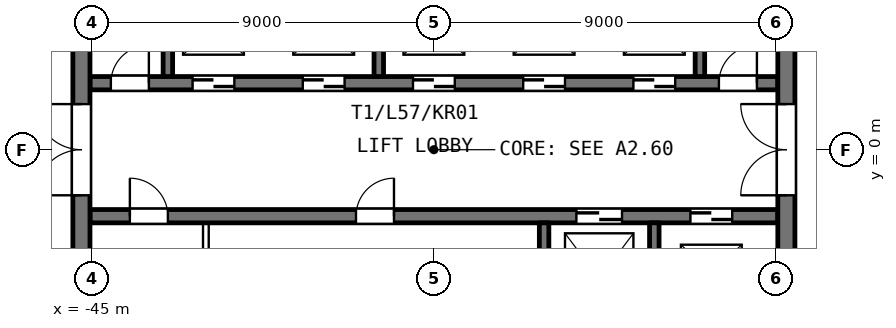
"""IFC4 building model, lengths in metres.
Left out: names, types, materials, properties, quantities, classifications, styles, units other than length and angle.
Written with IfcOpenShell. Run it as: python <this file> out.ifc"""

import sys

from ifc_helpers import new_model, si_unit, direction, frame, frame_2d, origin, place, context, subcontext, project, spatial, rectangle, extrude, element, fill, save


model = new_model("IFC4")
c1 = context("Model", 3, precision=1e-05, world=origin(), true_north=direction((0.0, 1.0)))
c2 = subcontext(c1, "Body", "Model", "MODEL_VIEW")
j1 = project(units=[si_unit("LENGTHUNIT", "METRE"), si_unit("PLANEANGLEUNIT", "RADIAN")], contexts=[c1])
p1 = place(None, origin())
s1 = spatial("IfcSite", under=j1, at=p1, CompositionType="ELEMENT")
p2 = place(p1, origin())
s2 = spatial("IfcBuilding", under=s1, at=p2, CompositionType="ELEMENT")
p3 = place(p2, frame((0.0, 0.0, 240.6)))
s3 = spatial("IfcBuildingStorey", under=s2, at=p3, CompositionType="ELEMENT", Elevation=240.6)
p4 = place(p3, frame((-45.05, -1.75, 0.0), z_axis=(0.0, 0.0, 1.0), x_axis=(1.0, 0.0, 0.0)))
e1 = element("IfcWall", 1, at=p4, inside=s3, PredefinedType="SHEAR", context=c2, shape_type="SweptSolid", body=[
    extrude(rectangle(XDim=18.1, YDim=0.35, at=frame_2d((9.05, 0.0))), origin(), (0.0, 0.0, 1.0), 3.6),
])
p5 = place(p4, frame((12.8, 0.0, 0.0)))
e2 = element("IfcOpeningElement", 2, at=p5, cuts=e1, PredefinedType="OPENING", context=c2, shape_type="SweptSolid", body=[
    extrude(rectangle(XDim=1.2, YDim=2.1, at=frame_2d((0.6, 1.05))), frame((0.0, 0.185, 0.0), z_axis=(0.0, -1.0, 0.0), x_axis=(1.0, 0.0, 0.0)), (0.0, 0.0, 1.0), 0.37),
])
p6 = place(p4, frame((15.8, 0.0, 0.0)))
e3 = element("IfcOpeningElement", 3, at=p6, cuts=e1, PredefinedType="OPENING", context=c2, shape_type="SweptSolid", body=[
    extrude(rectangle(XDim=1.1, YDim=2.1, at=frame_2d((0.55, 1.05))), frame((0.0, 0.185, 0.0), z_axis=(0.0, -1.0, 0.0), x_axis=(1.0, 0.0, 0.0)), (0.0, 0.0, 1.0), 0.37),
])
p7 = place(p4, frame((1.05, 0.0, 0.0)))
e4 = element("IfcOpeningElement", 4, at=p7, cuts=e1, PredefinedType="OPENING", context=c2, shape_type="SweptSolid", body=[
    extrude(rectangle(XDim=1.0, YDim=2.1, at=frame_2d((0.5, 1.05))), frame((0.0, 0.185, 0.0), z_axis=(0.0, -1.0, 0.0), x_axis=(1.0, 0.0, 0.0)), (0.0, 0.0, 1.0), 0.37),
])
p8 = place(p4, frame((7.0, 0.0, 0.0)))
e5 = element("IfcOpeningElement", 5, at=p8, cuts=e1, PredefinedType="OPENING", context=c2, shape_type="SweptSolid", body=[
    extrude(rectangle(XDim=1.0, YDim=2.1, at=frame_2d((0.5, 1.05))), frame((0.0, 0.185, 0.0), z_axis=(0.0, -1.0, 0.0), x_axis=(1.0, 0.0, 0.0)), (0.0, 0.0, 1.0), 0.37),
])
p9 = place(p3, frame((-45.05, 1.75, 0.0), z_axis=(0.0, 0.0, 1.0), x_axis=(1.0, 0.0, 0.0)))
e6 = element("IfcWall", 6, at=p9, inside=s3, PredefinedType="SHEAR", context=c2, shape_type="SweptSolid", body=[
    extrude(rectangle(XDim=18.1, YDim=0.35, at=frame_2d((9.05, 0.0))), origin(), (0.0, 0.0, 1.0), 3.6),
])
p10 = place(p9, frame((0.55, 0.0, 0.0)))
e7 = element("IfcOpeningElement", 7, at=p10, cuts=e6, PredefinedType="OPENING", context=c2, shape_type="SweptSolid", body=[
    extrude(rectangle(XDim=1.0, YDim=2.1, at=frame_2d((0.5, 1.05))), frame((0.0, 0.185, 0.0), z_axis=(0.0, -1.0, 0.0), x_axis=(1.0, 0.0, 0.0)), (0.0, 0.0, 1.0), 0.37),
])
p11 = place(p9, frame((2.7, 0.0, 0.0)))
e8 = element("IfcOpeningElement", 8, at=p11, cuts=e6, PredefinedType="OPENING", context=c2, shape_type="SweptSolid", body=[
    extrude(rectangle(XDim=1.1, YDim=2.1, at=frame_2d((0.55, 1.05))), frame((0.0, 0.185, 0.0), z_axis=(0.0, -1.0, 0.0), x_axis=(1.0, 0.0, 0.0)), (0.0, 0.0, 1.0), 0.37),
])
p12 = place(p9, frame((5.6, 0.0, 0.0)))
e9 = element("IfcOpeningElement", 9, at=p12, cuts=e6, PredefinedType="OPENING", context=c2, shape_type="SweptSolid", body=[
    extrude(rectangle(XDim=1.1, YDim=2.1, at=frame_2d((0.55, 1.05))), frame((0.0, 0.185, 0.0), z_axis=(0.0, -1.0, 0.0), x_axis=(1.0, 0.0, 0.0)), (0.0, 0.0, 1.0), 0.37),
])
p13 = place(p9, frame((8.5, 0.0, 0.0)))
e10 = element("IfcOpeningElement", 10, at=p13, cuts=e6, PredefinedType="OPENING", context=c2, shape_type="SweptSolid", body=[
    extrude(rectangle(XDim=1.1, YDim=2.1, at=frame_2d((0.55, 1.05))), frame((0.0, 0.185, 0.0), z_axis=(0.0, -1.0, 0.0), x_axis=(1.0, 0.0, 0.0)), (0.0, 0.0, 1.0), 0.37),
])
p14 = place(p9, frame((11.4, 0.0, 0.0)))
e11 = element("IfcOpeningElement", 11, at=p14, cuts=e6, PredefinedType="OPENING", context=c2, shape_type="SweptSolid", body=[
    extrude(rectangle(XDim=1.1, YDim=2.1, at=frame_2d((0.55, 1.05))), frame((0.0, 0.185, 0.0), z_axis=(0.0, -1.0, 0.0), x_axis=(1.0, 0.0, 0.0)), (0.0, 0.0, 1.0), 0.37),
])
p15 = place(p9, frame((14.3, 0.0, 0.0)))
e12 = element("IfcOpeningElement", 12, at=p15, cuts=e6, PredefinedType="OPENING", context=c2, shape_type="SweptSolid", body=[
    extrude(rectangle(XDim=1.1, YDim=2.1, at=frame_2d((0.55, 1.05))), frame((0.0, 0.185, 0.0), z_axis=(0.0, -1.0, 0.0), x_axis=(1.0, 0.0, 0.0)), (0.0, 0.0, 1.0), 0.37),
])
p16 = place(p9, frame((16.55, 0.0, 0.0)))
e13 = element("IfcOpeningElement", 13, at=p16, cuts=e6, PredefinedType="OPENING", context=c2, shape_type="SweptSolid", body=[
    extrude(rectangle(XDim=1.0, YDim=2.1, at=frame_2d((0.5, 1.05))), frame((0.0, 0.185, 0.0), z_axis=(0.0, -1.0, 0.0), x_axis=(1.0, 0.0, 0.0)), (0.0, 0.0, 1.0), 0.37),
])
p17 = place(p3, frame((-45.275, -9.5, 0.0), z_axis=(0.0, 0.0, 1.0), x_axis=(0.0, 1.0, 0.0)))
e14 = element("IfcWall", 14, at=p17, inside=s3, PredefinedType="SHEAR", context=c2, shape_type="SweptSolid", body=[
    extrude(rectangle(XDim=19.0, YDim=0.45, at=frame_2d((9.5, 0.0))), origin(), (0.0, 0.0, 1.0), 3.6),
])
p18 = place(p17, frame((8.3, 0.0, 0.0)))
e15 = element("IfcOpeningElement", 15, at=p18, cuts=e14, PredefinedType="OPENING", context=c2, shape_type="SweptSolid", body=[
    extrude(rectangle(XDim=2.4, YDim=2.1, at=frame_2d((1.2, 1.05))), frame((0.0, 0.235, 0.0), z_axis=(0.0, -1.0, 0.0), x_axis=(1.0, 0.0, 0.0)), (0.0, 0.0, 1.0), 0.47),
])
p19 = place(p3, frame((-43.0, 1.925, 0.0), z_axis=(0.0, 0.0, 1.0), x_axis=(0.0, 1.0, 0.0)))
e16 = element("IfcWall", 16, at=p19, inside=s3, PredefinedType="SHEAR", context=c2, shape_type="SweptSolid", body=[
    extrude(rectangle(XDim=2.7, YDim=0.25, at=frame_2d((1.35, 0.0))), origin(), (0.0, 0.0, 1.0), 3.6),
])
p20 = place(p3, frame((-42.0, -4.675, 0.0), z_axis=(0.0, 0.0, 1.0), x_axis=(0.0, 1.0, 0.0)))
e17 = element("IfcWall", 17, at=p20, inside=s3, PredefinedType="PARTITIONING", context=c2, shape_type="SweptSolid", body=[
    extrude(rectangle(XDim=2.75, YDim=0.15, at=frame_2d((1.375, 0.0))), origin(), (0.0, 0.0, 1.0), 3.6),
])
for number, where, z_axis, x_axis in (
    (18, (-37.45, 1.925, 0.0), (0.0, 0.0, 1.0), (0.0, 1.0, 0.0)),
    (19, (-33.1, -4.625, 0.0), (0.0, 0.0, 1.0), (0.0, 1.0, 0.0)),
    (20, (-30.2, -4.625, 0.0), (0.0, 0.0, 1.0), (0.0, 1.0, 0.0)),
):
    element("IfcWall", number, at=place(p3, frame(where, z_axis=z_axis, x_axis=x_axis)), inside=s3, PredefinedType="SHEAR", context=c2, shape_type="SweptSolid", body=[
        extrude(rectangle(XDim=2.7, YDim=0.25, at=frame_2d((1.35, 0.0))), origin(), (0.0, 0.0, 1.0), 3.6),
    ])
p21 = place(p3, frame((-29.0, 1.925, 0.0), z_axis=(0.0, 0.0, 1.0), x_axis=(0.0, 1.0, 0.0)))
e21 = element("IfcWall", 21, at=p21, inside=s3, PredefinedType="SHEAR", context=c2, shape_type="SweptSolid", body=[
    extrude(rectangle(XDim=2.95, YDim=0.25, at=frame_2d((1.475, 0.0))), origin(), (0.0, 0.0, 1.0), 3.6),
])
p22 = place(p3, frame((-26.725, -9.5, 0.0), z_axis=(0.0, 0.0, 1.0), x_axis=(0.0, 1.0, 0.0)))
e22 = element("IfcWall", 22, at=p22, inside=s3, PredefinedType="SHEAR", context=c2, shape_type="SweptSolid", body=[
    extrude(rectangle(XDim=19.0, YDim=0.45, at=frame_2d((9.5, 0.0))), origin(), (0.0, 0.0, 1.0), 3.6),
])
p23 = place(p22, frame((8.3, 0.0, 0.0)))
e23 = element("IfcOpeningElement", 23, at=p23, cuts=e22, PredefinedType="OPENING", context=c2, shape_type="SweptSolid", body=[
    extrude(rectangle(XDim=2.4, YDim=2.1, at=frame_2d((1.2, 1.05))), frame((0.0, 0.235, 0.0), z_axis=(0.0, -1.0, 0.0), x_axis=(1.0, 0.0, 0.0)), (0.0, 0.0, 1.0), 0.47),
])
p24 = place(p18, origin())
e24 = element("IfcDoor", 24, at=p24, inside=s3, OperationType="DOUBLE_DOOR_SINGLE_SWING", PredefinedType="DOOR", context=c2, shape_type="SweptSolid", body=[
    extrude(rectangle(XDim=2.4, YDim=2.1, at=frame_2d((1.2, 1.05))), frame((0.0, 0.025, 0.0), z_axis=(0.0, -1.0, 0.0), x_axis=(1.0, 0.0, 0.0)), (0.0, 0.0, 1.0), 0.05),
])
fill(e15, e24)
p25 = place(p23, origin())
e25 = element("IfcDoor", 25, at=p25, inside=s3, OperationType="DOUBLE_DOOR_SINGLE_SWING", PredefinedType="DOOR", context=c2, shape_type="SweptSolid", body=[
    extrude(rectangle(XDim=2.4, YDim=2.1, at=frame_2d((1.2, 1.05))), frame((0.0, 0.025, 0.0), z_axis=(0.0, -1.0, 0.0), x_axis=(1.0, 0.0, 0.0)), (0.0, 0.0, 1.0), 0.05),
])
fill(e23, e25)
p26 = place(p10, origin())
e26 = element("IfcDoor", 26, at=p26, inside=s3, OperationType="SINGLE_SWING_RIGHT", PredefinedType="DOOR", context=c2, shape_type="SweptSolid", body=[
    extrude(rectangle(XDim=1.0, YDim=2.1, at=frame_2d((0.5, 1.05))), frame((0.0, 0.025, 0.0), z_axis=(0.0, -1.0, 0.0), x_axis=(1.0, 0.0, 0.0)), (0.0, 0.0, 1.0), 0.05),
])
fill(e7, e26)
p27 = place(p11, origin())
e27 = element("IfcDoor", 27, at=p27, inside=s3, OperationType="SLIDING_TO_LEFT", PredefinedType="DOOR", context=c2, shape_type="SweptSolid", body=[
    extrude(rectangle(XDim=1.1, YDim=2.1, at=frame_2d((0.55, 1.05))), frame((0.0, 0.025, 0.0), z_axis=(0.0, -1.0, 0.0), x_axis=(1.0, 0.0, 0.0)), (0.0, 0.0, 1.0), 0.05),
])
fill(e8, e27)
p28 = place(p12, origin())
e28 = element("IfcDoor", 28, at=p28, inside=s3, OperationType="SLIDING_TO_LEFT", PredefinedType="DOOR", context=c2, shape_type="SweptSolid", body=[
    extrude(rectangle(XDim=1.1, YDim=2.1, at=frame_2d((0.55, 1.05))), frame((0.0, 0.025, 0.0), z_axis=(0.0, -1.0, 0.0), x_axis=(1.0, 0.0, 0.0)), (0.0, 0.0, 1.0), 0.05),
])
fill(e9, e28)
p29 = place(p13, origin())
e29 = element("IfcDoor", 29, at=p29, inside=s3, OperationType="SLIDING_TO_LEFT", PredefinedType="DOOR", context=c2, shape_type="SweptSolid", body=[
    extrude(rectangle(XDim=1.1, YDim=2.1, at=frame_2d((0.55, 1.05))), frame((0.0, 0.025, 0.0), z_axis=(0.0, -1.0, 0.0), x_axis=(1.0, 0.0, 0.0)), (0.0, 0.0, 1.0), 0.05),
])
fill(e10, e29)
p30 = place(p14, origin())
e30 = element("IfcDoor", 30, at=p30, inside=s3, OperationType="SLIDING_TO_LEFT", PredefinedType="DOOR", context=c2, shape_type="SweptSolid", body=[
    extrude(rectangle(XDim=1.1, YDim=2.1, at=frame_2d((0.55, 1.05))), frame((0.0, 0.025, 0.0), z_axis=(0.0, -1.0, 0.0), x_axis=(1.0, 0.0, 0.0)), (0.0, 0.0, 1.0), 0.05),
])
fill(e11, e30)
p31 = place(p15, origin())
e31 = element("IfcDoor", 31, at=p31, inside=s3, OperationType="SLIDING_TO_LEFT", PredefinedType="DOOR", context=c2, shape_type="SweptSolid", body=[
    extrude(rectangle(XDim=1.1, YDim=2.1, at=frame_2d((0.55, 1.05))), frame((0.0, 0.025, 0.0), z_axis=(0.0, -1.0, 0.0), x_axis=(1.0, 0.0, 0.0)), (0.0, 0.0, 1.0), 0.05),
])
fill(e12, e31)
p32 = place(p16, origin())
e32 = element("IfcDoor", 32, at=p32, inside=s3, OperationType="SINGLE_SWING_RIGHT", PredefinedType="DOOR", context=c2, shape_type="SweptSolid", body=[
    extrude(rectangle(XDim=1.0, YDim=2.1, at=frame_2d((0.5, 1.05))), frame((0.0, 0.025, 0.0), z_axis=(0.0, -1.0, 0.0), x_axis=(1.0, 0.0, 0.0)), (0.0, 0.0, 1.0), 0.05),
])
fill(e13, e32)
p33 = place(p5, origin())
e33 = element("IfcDoor", 33, at=p33, inside=s3, OperationType="SLIDING_TO_LEFT", PredefinedType="DOOR", context=c2, shape_type="SweptSolid", body=[
    extrude(rectangle(XDim=1.2, YDim=2.1, at=frame_2d((0.6, 1.05))), frame((0.0, 0.025, 0.0), z_axis=(0.0, -1.0, 0.0), x_axis=(1.0, 0.0, 0.0)), (0.0, 0.0, 1.0), 0.05),
])
fill(e2, e33)
p34 = place(p6, origin())
e34 = element("IfcDoor", 34, at=p34, inside=s3, OperationType="SLIDING_TO_LEFT", PredefinedType="DOOR", context=c2, shape_type="SweptSolid", body=[
    extrude(rectangle(XDim=1.1, YDim=2.1, at=frame_2d((0.55, 1.05))), frame((0.0, 0.025, 0.0), z_axis=(0.0, -1.0, 0.0), x_axis=(1.0, 0.0, 0.0)), (0.0, 0.0, 1.0), 0.05),
])
fill(e3, e34)
p35 = place(p7, origin())
e35 = element("IfcDoor", 35, at=p35, inside=s3, OperationType="SINGLE_SWING_LEFT", PredefinedType="DOOR", context=c2, shape_type="SweptSolid", body=[
    extrude(rectangle(XDim=1.0, YDim=2.1, at=frame_2d((0.5, 1.05))), frame((0.0, 0.025, 0.0), z_axis=(0.0, -1.0, 0.0), x_axis=(1.0, 0.0, 0.0)), (0.0, 0.0, 1.0), 0.05),
])
fill(e4, e35)
p36 = place(p8, origin())
e36 = element("IfcDoor", 36, at=p36, inside=s3, OperationType="SINGLE_SWING_RIGHT", PredefinedType="DOOR", context=c2, shape_type="SweptSolid", body=[
    extrude(rectangle(XDim=1.0, YDim=2.1, at=frame_2d((0.5, 1.05))), frame((0.0, 0.025, 0.0), z_axis=(0.0, -1.0, 0.0), x_axis=(1.0, 0.0, 0.0)), (0.0, 0.0, 1.0), 0.05),
])
fill(e5, e36)
save(model, sys.argv[1])
